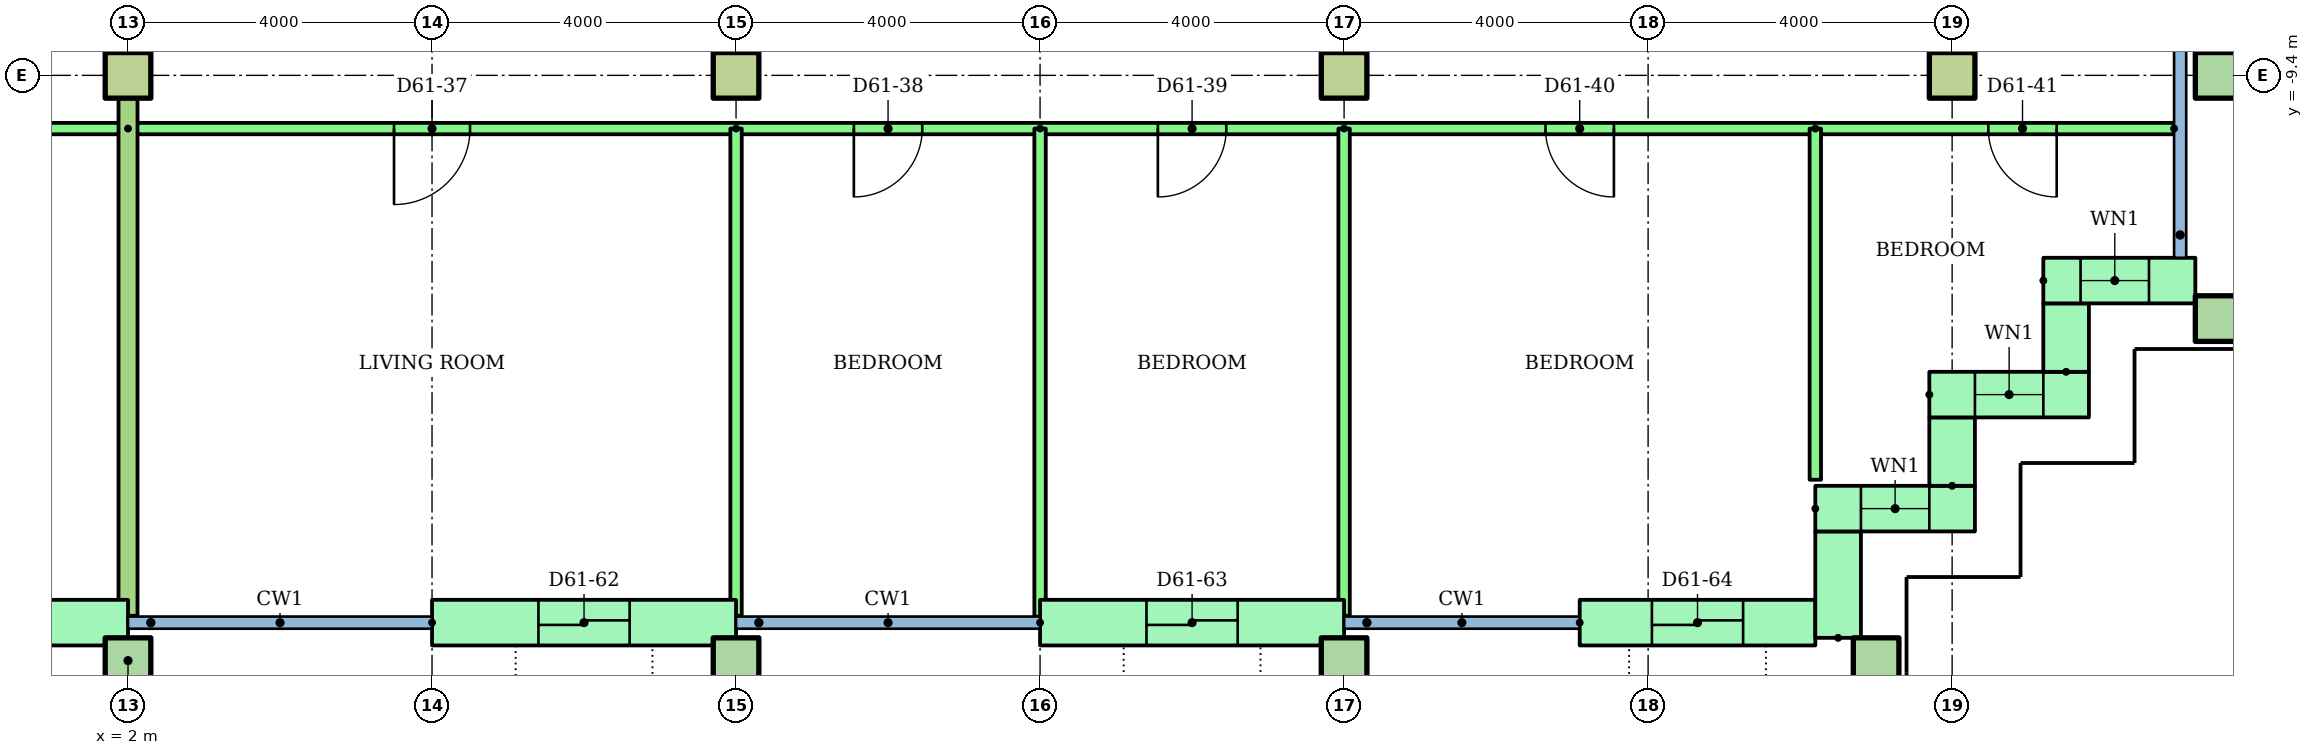
"""IFC4 building model, lengths in metres.
Left out: names, types, materials, properties, quantities, classifications, styles, units other than length and angle.
Written with IfcOpenShell. Run it as: python <this file> out.ifc"""

import sys

from ifc_helpers import new_model, si_unit, direction, frame, frame_2d, origin, origin_2d, place, context, subcontext, project, spatial, rectangle, hollow_rectangle, extrude, element, fill, save


model = new_model("IFC4")
c1 = context("Model", 3, precision=1e-05, world=origin(), true_north=direction((0.0, 1.0)))
c2 = subcontext(c1, "Body", "Model", "MODEL_VIEW")
j1 = project(units=[si_unit("LENGTHUNIT", "METRE"), si_unit("PLANEANGLEUNIT", "RADIAN")], contexts=[c1])
p1 = place(None, origin())
s1 = spatial("IfcSite", under=j1, at=p1, CompositionType="ELEMENT")
p2 = place(p1, origin())
s2 = spatial("IfcBuilding", under=s1, at=p2, CompositionType="ELEMENT")
p3 = place(p2, frame((0.0, 0.0, 233.2)))
s3 = spatial("IfcBuildingStorey", under=s2, at=p3, CompositionType="ELEMENT", Elevation=233.2)
for number, where in (
    (1, (2.0, -17.1, 0.0)),
    (2, (10.0, -17.1, 0.0)),
    (3, (18.0, -17.1, 0.0)),
    (4, (25.0, -17.1, 0.0)),
    (5, (29.5, -12.6, 0.0)),
):
    element("IfcColumn", number, at=place(p3, frame(where)), inside=s3, PredefinedType="COLUMN", context=c2, shape_type="SweptSolid", body=[
        extrude(hollow_rectangle(XDim=0.6, YDim=0.6, WallThickness=0.03, at=origin_2d()), origin(), (0.0, 0.0, 1.0), 3.2),
    ])
for number, where in (
    (6, (2.0, -9.4, 0.0)),
    (7, (10.0, -9.4, 0.0)),
    (8, (18.0, -9.4, 0.0)),
    (9, (26.0, -9.4, 0.0)),
):
    element("IfcColumn", number, at=place(p3, frame(where)), inside=s3, PredefinedType="COLUMN", context=c2, shape_type="SweptSolid", body=[
        extrude(rectangle(XDim=0.6, YDim=0.6, at=origin_2d()), origin(), (0.0, 0.0, 1.0), 3.2),
    ])
p4 = place(p3, frame((29.5, -9.4, 0.0)))
e10 = element("IfcColumn", 10, at=p4, inside=s3, PredefinedType="COLUMN", context=c2, shape_type="SweptSolid", body=[
    extrude(hollow_rectangle(XDim=0.6, YDim=0.6, WallThickness=0.03, at=origin_2d()), origin(), (0.0, 0.0, 1.0), 3.2),
])
p5 = place(p3, frame((-2.0, -16.6, 0.0)))
e11 = element("IfcWall", 11, at=p5, inside=s3, PredefinedType="STANDARD", context=c2, shape_type="SweptSolid", body=[
    extrude(rectangle(XDim=4.0, YDim=0.6, at=frame_2d((2.0, 0.0))), origin(), (0.0, 0.0, 1.0), 2.92),
])
p6 = place(p5, frame((1.4, 0.0, 0.0)))
e12 = element("IfcOpeningElement", 12, at=p6, cuts=e11, PredefinedType="OPENING", context=c2, shape_type="SweptSolid", body=[
    extrude(rectangle(XDim=1.2, YDim=2.1, at=frame_2d((0.6, 1.05))), frame((0.0, 0.31, 0.0), z_axis=(0.0, -1.0, 0.0), x_axis=(1.0, 0.0, 0.0)), (0.0, 0.0, 1.0), 0.62),
])
p7 = place(p3, frame((6.0, -16.6, 0.0)))
e13 = element("IfcWall", 13, at=p7, inside=s3, PredefinedType="STANDARD", context=c2, shape_type="SweptSolid", body=[
    extrude(rectangle(XDim=4.0, YDim=0.6, at=frame_2d((2.0, 0.0))), origin(), (0.0, 0.0, 1.0), 2.92),
])
p8 = place(p7, frame((1.4, 0.0, 0.0)))
e14 = element("IfcOpeningElement", 14, at=p8, cuts=e13, PredefinedType="OPENING", context=c2, shape_type="SweptSolid", body=[
    extrude(rectangle(XDim=1.2, YDim=2.1, at=frame_2d((0.6, 1.05))), frame((0.0, 0.31, 0.0), z_axis=(0.0, -1.0, 0.0), x_axis=(1.0, 0.0, 0.0)), (0.0, 0.0, 1.0), 0.62),
])
p9 = place(p3, frame((14.0, -16.6, 0.0)))
e15 = element("IfcWall", 15, at=p9, inside=s3, PredefinedType="STANDARD", context=c2, shape_type="SweptSolid", body=[
    extrude(rectangle(XDim=4.0, YDim=0.6, at=frame_2d((2.0, 0.0))), origin(), (0.0, 0.0, 1.0), 2.92),
])
p10 = place(p9, frame((1.4, 0.0, 0.0)))
e16 = element("IfcOpeningElement", 16, at=p10, cuts=e15, PredefinedType="OPENING", context=c2, shape_type="SweptSolid", body=[
    extrude(rectangle(XDim=1.2, YDim=2.1, at=frame_2d((0.6, 1.05))), frame((0.0, 0.31, 0.0), z_axis=(0.0, -1.0, 0.0), x_axis=(1.0, 0.0, 0.0)), (0.0, 0.0, 1.0), 0.62),
])
p11 = place(p3, frame((21.1, -16.6, 0.0)))
e17 = element("IfcWall", 17, at=p11, inside=s3, PredefinedType="STANDARD", context=c2, shape_type="SweptSolid", body=[
    extrude(rectangle(XDim=3.1, YDim=0.6, at=frame_2d((1.55, 0.0))), origin(), (0.0, 0.0, 1.0), 2.92),
])
p12 = place(p11, frame((0.95, 0.0, 0.0)))
e18 = element("IfcOpeningElement", 18, at=p12, cuts=e17, PredefinedType="OPENING", context=c2, shape_type="SweptSolid", body=[
    extrude(rectangle(XDim=1.2, YDim=2.1, at=frame_2d((0.6, 1.05))), frame((0.0, 0.31, 0.0), z_axis=(0.0, -1.0, 0.0), x_axis=(1.0, 0.0, 0.0)), (0.0, 0.0, 1.0), 0.62),
])
p13 = place(p3, frame((24.5, -16.8, 0.0), z_axis=(0.0, 0.0, 1.0), x_axis=(0.0, 1.0, 0.0)))
e19 = element("IfcWall", 19, at=p13, inside=s3, PredefinedType="STANDARD", context=c2, shape_type="SweptSolid", body=[
    extrude(rectangle(XDim=1.4, YDim=0.6, at=frame_2d((0.7, 0.0))), origin(), (0.0, 0.0, 1.0), 2.92),
])
p14 = place(p3, frame((24.2, -15.1, 0.0)))
e20 = element("IfcWall", 20, at=p14, inside=s3, PredefinedType="STANDARD", context=c2, shape_type="SweptSolid", body=[
    extrude(rectangle(XDim=2.1, YDim=0.6, at=frame_2d((1.05, 0.0))), origin(), (0.0, 0.0, 1.0), 2.92),
])
p15 = place(p14, frame((0.6, 0.0, 0.9)))
e21 = element("IfcOpeningElement", 21, at=p15, cuts=e20, PredefinedType="OPENING", context=c2, shape_type="SweptSolid", body=[
    extrude(rectangle(XDim=0.9, YDim=1.5, at=frame_2d((0.45, 0.75))), frame((0.0, 0.31, 0.0), z_axis=(0.0, -1.0, 0.0), x_axis=(1.0, 0.0, 0.0)), (0.0, 0.0, 1.0), 0.62),
])
p16 = place(p3, frame((26.0, -14.8, 0.0), z_axis=(0.0, 0.0, 1.0), x_axis=(0.0, 1.0, 0.0)))
e22 = element("IfcWall", 22, at=p16, inside=s3, PredefinedType="STANDARD", context=c2, shape_type="SweptSolid", body=[
    extrude(rectangle(XDim=0.9, YDim=0.6, at=frame_2d((0.45, 0.0))), origin(), (0.0, 0.0, 1.0), 2.92),
])
p17 = place(p3, frame((25.7, -13.6, 0.0)))
e23 = element("IfcWall", 23, at=p17, inside=s3, PredefinedType="STANDARD", context=c2, shape_type="SweptSolid", body=[
    extrude(rectangle(XDim=2.1, YDim=0.6, at=frame_2d((1.05, 0.0))), origin(), (0.0, 0.0, 1.0), 2.92),
])
p18 = place(p17, frame((0.6, 0.0, 0.9)))
e24 = element("IfcOpeningElement", 24, at=p18, cuts=e23, PredefinedType="OPENING", context=c2, shape_type="SweptSolid", body=[
    extrude(rectangle(XDim=0.9, YDim=1.5, at=frame_2d((0.45, 0.75))), frame((0.0, 0.31, 0.0), z_axis=(0.0, -1.0, 0.0), x_axis=(1.0, 0.0, 0.0)), (0.0, 0.0, 1.0), 0.62),
])
p19 = place(p3, frame((27.5, -13.3, 0.0), z_axis=(0.0, 0.0, 1.0), x_axis=(0.0, 1.0, 0.0)))
e25 = element("IfcWall", 25, at=p19, inside=s3, PredefinedType="STANDARD", context=c2, shape_type="SweptSolid", body=[
    extrude(rectangle(XDim=0.9, YDim=0.6, at=frame_2d((0.45, 0.0))), origin(), (0.0, 0.0, 1.0), 2.92),
])
p20 = place(p3, frame((27.2, -12.1, 0.0)))
e26 = element("IfcWall", 26, at=p20, inside=s3, PredefinedType="STANDARD", context=c2, shape_type="SweptSolid", body=[
    extrude(rectangle(XDim=2.0, YDim=0.6, at=frame_2d((1.0, 0.0))), origin(), (0.0, 0.0, 1.0), 2.92),
])
p21 = place(p20, frame((0.49, 0.0, 0.9)))
e27 = element("IfcOpeningElement", 27, at=p21, cuts=e26, PredefinedType="OPENING", context=c2, shape_type="SweptSolid", body=[
    extrude(rectangle(XDim=0.9, YDim=1.5, at=frame_2d((0.45, 0.75))), frame((0.0, 0.31, 0.0), z_axis=(0.0, -1.0, 0.0), x_axis=(1.0, 0.0, 0.0)), (0.0, 0.0, 1.0), 0.62),
])
p22 = place(p3, frame((2.0, -10.1, 0.0), z_axis=(0.0, 0.0, 1.0), x_axis=(-1.0, 0.0, 0.0)))
e28 = element("IfcWall", 28, at=p22, inside=s3, PredefinedType="PARTITIONING", context=c2, shape_type="SweptSolid", body=[
    extrude(rectangle(XDim=16.0, YDim=0.15, at=frame_2d((8.0, 0.0))), origin(), (0.0, 0.0, 1.0), 2.4),
])
p23 = place(p22, frame((13.55, 0.0, 0.0)))
e29 = element("IfcOpeningElement", 29, at=p23, cuts=e28, PredefinedType="OPENING", context=c2, shape_type="SweptSolid", body=[
    extrude(rectangle(XDim=0.9, YDim=2.1, at=frame_2d((0.45, 1.05))), frame((0.0, 0.085, 0.0), z_axis=(0.0, -1.0, 0.0), x_axis=(1.0, 0.0, 0.0)), (0.0, 0.0, 1.0), 0.17),
])
p24 = place(p22, frame((9.5, 0.0, 0.0)))
e30 = element("IfcOpeningElement", 30, at=p24, cuts=e28, PredefinedType="OPENING", context=c2, shape_type="SweptSolid", body=[
    extrude(rectangle(XDim=1.0, YDim=2.1, at=frame_2d((0.5, 1.05))), frame((0.0, 0.085, 0.0), z_axis=(0.0, -1.0, 0.0), x_axis=(1.0, 0.0, 0.0)), (0.0, 0.0, 1.0), 0.17),
])
p25 = place(p22, frame((5.55, 0.0, 0.0)))
e31 = element("IfcOpeningElement", 31, at=p25, cuts=e28, PredefinedType="OPENING", context=c2, shape_type="SweptSolid", body=[
    extrude(rectangle(XDim=0.9, YDim=2.1, at=frame_2d((0.45, 1.05))), frame((0.0, 0.085, 0.0), z_axis=(0.0, -1.0, 0.0), x_axis=(1.0, 0.0, 0.0)), (0.0, 0.0, 1.0), 0.17),
])
p26 = place(p22, frame((1.55, 0.0, 0.0)))
e32 = element("IfcOpeningElement", 32, at=p26, cuts=e28, PredefinedType="OPENING", context=c2, shape_type="SweptSolid", body=[
    extrude(rectangle(XDim=0.9, YDim=2.1, at=frame_2d((0.45, 1.05))), frame((0.0, 0.085, 0.0), z_axis=(0.0, -1.0, 0.0), x_axis=(1.0, 0.0, 0.0)), (0.0, 0.0, 1.0), 0.17),
])
p27 = place(p3, frame((28.92, -10.1, 0.0), z_axis=(0.0, 0.0, 1.0), x_axis=(-1.0, 0.0, 0.0)))
e33 = element("IfcWall", 33, at=p27, inside=s3, PredefinedType="PARTITIONING", context=c2, shape_type="SweptSolid", body=[
    extrude(rectangle(XDim=26.92, YDim=0.15, at=frame_2d((13.46, 0.0))), origin(), (0.0, 0.0, 1.0), 2.4),
])
p28 = place(p27, frame((22.42, 0.0, 0.0)))
e34 = element("IfcOpeningElement", 34, at=p28, cuts=e33, PredefinedType="OPENING", context=c2, shape_type="SweptSolid", body=[
    extrude(rectangle(XDim=1.0, YDim=2.1, at=frame_2d((0.5, 1.05))), frame((0.0, 0.085, 0.0), z_axis=(0.0, -1.0, 0.0), x_axis=(1.0, 0.0, 0.0)), (0.0, 0.0, 1.0), 0.17),
])
p29 = place(p27, frame((16.47, 0.0, 0.0)))
e35 = element("IfcOpeningElement", 35, at=p29, cuts=e33, PredefinedType="OPENING", context=c2, shape_type="SweptSolid", body=[
    extrude(rectangle(XDim=0.9, YDim=2.1, at=frame_2d((0.45, 1.05))), frame((0.0, 0.085, 0.0), z_axis=(0.0, -1.0, 0.0), x_axis=(1.0, 0.0, 0.0)), (0.0, 0.0, 1.0), 0.17),
])
p30 = place(p27, frame((12.47, 0.0, 0.0)))
e36 = element("IfcOpeningElement", 36, at=p30, cuts=e33, PredefinedType="OPENING", context=c2, shape_type="SweptSolid", body=[
    extrude(rectangle(XDim=0.9, YDim=2.1, at=frame_2d((0.45, 1.05))), frame((0.0, 0.085, 0.0), z_axis=(0.0, -1.0, 0.0), x_axis=(1.0, 0.0, 0.0)), (0.0, 0.0, 1.0), 0.17),
])
p31 = place(p27, frame((7.37, 0.0, 0.0)))
e37 = element("IfcOpeningElement", 37, at=p31, cuts=e33, PredefinedType="OPENING", context=c2, shape_type="SweptSolid", body=[
    extrude(rectangle(XDim=0.9, YDim=2.1, at=frame_2d((0.45, 1.05))), frame((0.0, 0.085, 0.0), z_axis=(0.0, -1.0, 0.0), x_axis=(1.0, 0.0, 0.0)), (0.0, 0.0, 1.0), 0.17),
])
p32 = place(p27, frame((1.544, 0.0, 0.0)))
e38 = element("IfcOpeningElement", 38, at=p32, cuts=e33, PredefinedType="OPENING", context=c2, shape_type="SweptSolid", body=[
    extrude(rectangle(XDim=0.9, YDim=2.1, at=frame_2d((0.45, 1.05))), frame((0.0, 0.085, 0.0), z_axis=(0.0, -1.0, 0.0), x_axis=(1.0, 0.0, 0.0)), (0.0, 0.0, 1.0), 0.17),
])
p33 = place(p3, frame((10.0, -10.1, 0.0), z_axis=(0.0, 0.0, 1.0), x_axis=(0.0, -1.0, 0.0)))
e39 = element("IfcWall", 39, at=p33, inside=s3, PredefinedType="PARTITIONING", context=c2, shape_type="SweptSolid", body=[
    extrude(rectangle(XDim=6.41, YDim=0.15, at=frame_2d((3.205, 0.0))), origin(), (0.0, 0.0, 1.0), 2.4),
])
p34 = place(p3, frame((14.0, -10.1, 0.0), z_axis=(0.0, 0.0, 1.0), x_axis=(0.0, -1.0, 0.0)))
e40 = element("IfcWall", 40, at=p34, inside=s3, PredefinedType="PARTITIONING", context=c2, shape_type="SweptSolid", body=[
    extrude(rectangle(XDim=6.421, YDim=0.15, at=frame_2d((3.21, 0.0))), origin(), (0.0, 0.0, 1.0), 2.4),
])
p35 = place(p3, frame((18.0, -10.1, 0.0), z_axis=(0.0, 0.0, 1.0), x_axis=(0.0, -1.0, 0.0)))
e41 = element("IfcWall", 41, at=p35, inside=s3, PredefinedType="PARTITIONING", context=c2, shape_type="SweptSolid", body=[
    extrude(rectangle(XDim=6.41, YDim=0.15, at=frame_2d((3.205, 0.0))), origin(), (0.0, 0.0, 1.0), 2.4),
])
p36 = place(p3, frame((24.2, -10.1, 0.0), z_axis=(0.0, 0.0, 1.0), x_axis=(0.0, -1.0, 0.0)))
e42 = element("IfcWall", 42, at=p36, inside=s3, PredefinedType="PARTITIONING", context=c2, shape_type="SweptSolid", body=[
    extrude(rectangle(XDim=4.62, YDim=0.15, at=frame_2d((2.31, 0.0))), origin(), (0.0, 0.0, 1.0), 2.4),
])
p37 = place(p3, frame((2.0, -1.4, 0.0), z_axis=(0.0, 0.0, 1.0), x_axis=(0.0, -1.0, 0.0)))
e43 = element("IfcWall", 43, at=p37, inside=s3, PredefinedType="PARTITIONING", context=c2, shape_type="SweptSolid", body=[
    extrude(rectangle(XDim=15.11, YDim=0.25, at=frame_2d((7.555, 0.0))), origin(), (0.0, 0.0, 1.0), 2.4),
])
p38 = place(p15, origin())
e44 = element("IfcWindow", 44, at=p38, inside=s3, PartitioningType="SINGLE_PANEL", PredefinedType="WINDOW", context=c2, shape_type="SweptSolid", body=[
    extrude(rectangle(XDim=0.9, YDim=1.5, at=frame_2d((0.45, 0.75))), frame((0.0, 0.03, 0.0), z_axis=(0.0, -1.0, 0.0), x_axis=(1.0, 0.0, 0.0)), (0.0, 0.0, 1.0), 0.06),
])
fill(e21, e44)
p39 = place(p18, origin())
e45 = element("IfcWindow", 45, at=p39, inside=s3, PartitioningType="SINGLE_PANEL", PredefinedType="WINDOW", context=c2, shape_type="SweptSolid", body=[
    extrude(rectangle(XDim=0.9, YDim=1.5, at=frame_2d((0.45, 0.75))), frame((0.0, 0.03, 0.0), z_axis=(0.0, -1.0, 0.0), x_axis=(1.0, 0.0, 0.0)), (0.0, 0.0, 1.0), 0.06),
])
fill(e24, e45)
p40 = place(p21, origin())
e46 = element("IfcWindow", 46, at=p40, inside=s3, PartitioningType="SINGLE_PANEL", PredefinedType="WINDOW", context=c2, shape_type="SweptSolid", body=[
    extrude(rectangle(XDim=0.9, YDim=1.5, at=frame_2d((0.45, 0.75))), frame((0.0, 0.03, 0.0), z_axis=(0.0, -1.0, 0.0), x_axis=(1.0, 0.0, 0.0)), (0.0, 0.0, 1.0), 0.06),
])
fill(e27, e46)
p41 = place(p28, origin())
e47 = element("IfcDoor", 47, at=p41, inside=s3, OperationType="SINGLE_SWING_RIGHT", PredefinedType="DOOR", context=c2, shape_type="SweptSolid", body=[
    extrude(rectangle(XDim=1.0, YDim=2.1, at=frame_2d((0.5, 1.05))), frame((0.0, 0.025, 0.0), z_axis=(0.0, -1.0, 0.0), x_axis=(1.0, 0.0, 0.0)), (0.0, 0.0, 1.0), 0.05),
])
fill(e34, e47)
p42 = place(p29, origin())
e48 = element("IfcDoor", 48, at=p42, inside=s3, OperationType="SINGLE_SWING_RIGHT", PredefinedType="DOOR", context=c2, shape_type="SweptSolid", body=[
    extrude(rectangle(XDim=0.9, YDim=2.1, at=frame_2d((0.45, 1.05))), frame((0.0, 0.025, 0.0), z_axis=(0.0, -1.0, 0.0), x_axis=(1.0, 0.0, 0.0)), (0.0, 0.0, 1.0), 0.05),
])
fill(e35, e48)
p43 = place(p30, origin())
e49 = element("IfcDoor", 49, at=p43, inside=s3, OperationType="SINGLE_SWING_RIGHT", PredefinedType="DOOR", context=c2, shape_type="SweptSolid", body=[
    extrude(rectangle(XDim=0.9, YDim=2.1, at=frame_2d((0.45, 1.05))), frame((0.0, 0.025, 0.0), z_axis=(0.0, -1.0, 0.0), x_axis=(1.0, 0.0, 0.0)), (0.0, 0.0, 1.0), 0.05),
])
fill(e36, e49)
p44 = place(p31, origin())
e50 = element("IfcDoor", 50, at=p44, inside=s3, OperationType="SINGLE_SWING_LEFT", PredefinedType="DOOR", context=c2, shape_type="SweptSolid", body=[
    extrude(rectangle(XDim=0.9, YDim=2.1, at=frame_2d((0.45, 1.05))), frame((0.0, 0.025, 0.0), z_axis=(0.0, -1.0, 0.0), x_axis=(1.0, 0.0, 0.0)), (0.0, 0.0, 1.0), 0.05),
])
fill(e37, e50)
p45 = place(p32, origin())
e51 = element("IfcDoor", 51, at=p45, inside=s3, OperationType="SINGLE_SWING_LEFT", PredefinedType="DOOR", context=c2, shape_type="SweptSolid", body=[
    extrude(rectangle(XDim=0.9, YDim=2.1, at=frame_2d((0.45, 1.05))), frame((0.0, 0.025, 0.0), z_axis=(0.0, -1.0, 0.0), x_axis=(1.0, 0.0, 0.0)), (0.0, 0.0, 1.0), 0.05),
])
fill(e38, e51)
p46 = place(p8, origin())
e52 = element("IfcDoor", 52, at=p46, inside=s3, OperationType="SLIDING_TO_LEFT", PredefinedType="DOOR", context=c2, shape_type="SweptSolid", body=[
    extrude(rectangle(XDim=1.2, YDim=2.1, at=frame_2d((0.6, 1.05))), frame((0.0, 0.025, 0.0), z_axis=(0.0, -1.0, 0.0), x_axis=(1.0, 0.0, 0.0)), (0.0, 0.0, 1.0), 0.05),
])
fill(e14, e52)
p47 = place(p10, origin())
e53 = element("IfcDoor", 53, at=p47, inside=s3, OperationType="SLIDING_TO_LEFT", PredefinedType="DOOR", context=c2, shape_type="SweptSolid", body=[
    extrude(rectangle(XDim=1.2, YDim=2.1, at=frame_2d((0.6, 1.05))), frame((0.0, 0.025, 0.0), z_axis=(0.0, -1.0, 0.0), x_axis=(1.0, 0.0, 0.0)), (0.0, 0.0, 1.0), 0.05),
])
fill(e16, e53)
p48 = place(p12, origin())
e54 = element("IfcDoor", 54, at=p48, inside=s3, OperationType="SLIDING_TO_LEFT", PredefinedType="DOOR", context=c2, shape_type="SweptSolid", body=[
    extrude(rectangle(XDim=1.2, YDim=2.1, at=frame_2d((0.6, 1.05))), frame((0.0, 0.025, 0.0), z_axis=(0.0, -1.0, 0.0), x_axis=(1.0, 0.0, 0.0)), (0.0, 0.0, 1.0), 0.05),
])
fill(e18, e54)
save(model, sys.argv[1])
